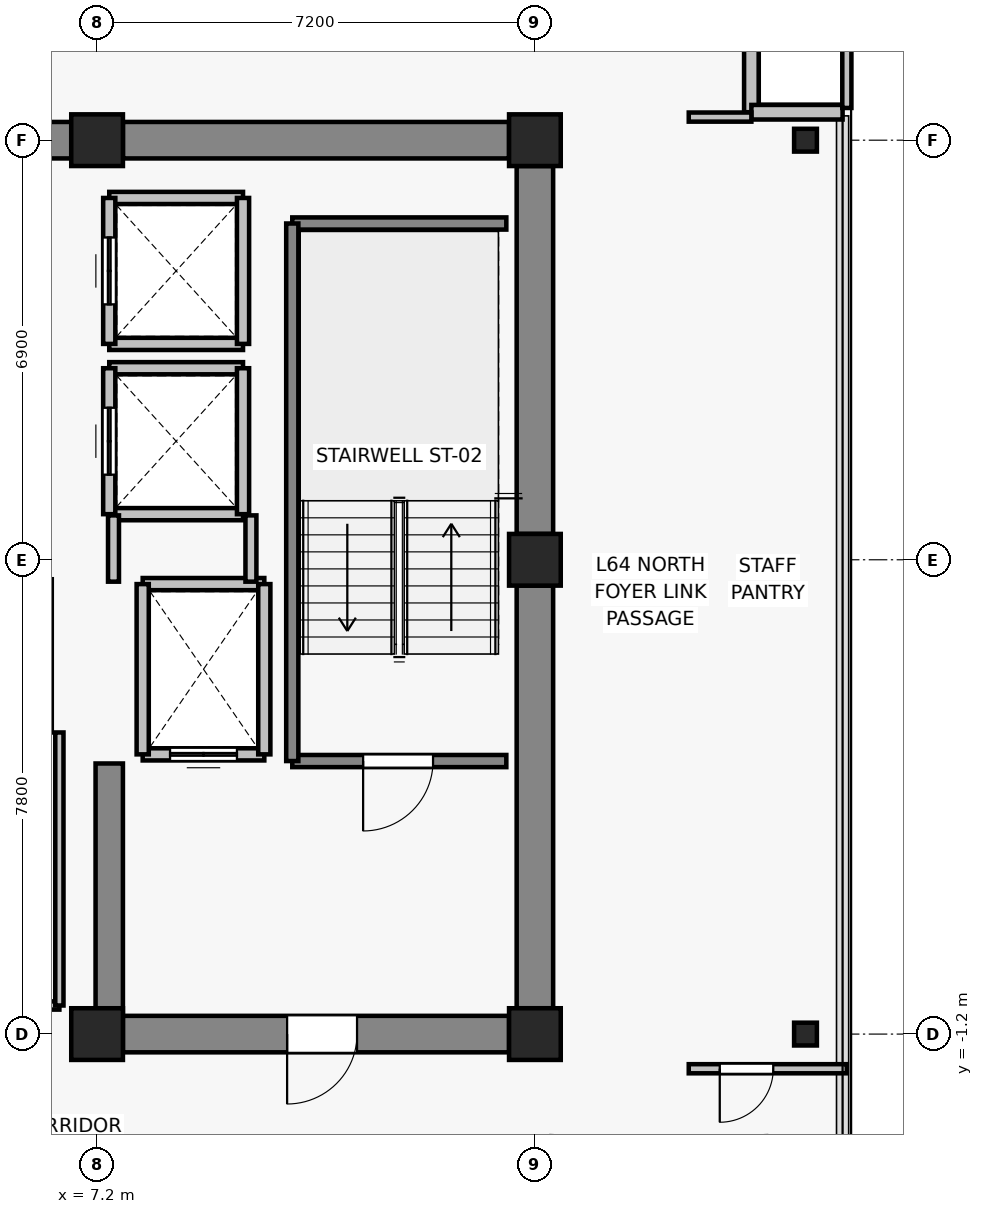
"""IFC4 building model, lengths in metres.
Left out: names, types, materials, properties, quantities, classifications, styles, units other than length and angle.
Written with IfcOpenShell. Run it as: python <this file> out.ifc"""

import sys

from ifc_helpers import new_model, si_unit, direction, frame, frame_2d, origin, origin_2d, place, context, subcontext, project, spatial, rectangle, i_section, extrude, source, transform, mapped, element, fill, save


model = new_model("IFC4")
c1 = context("Model", 3, precision=1e-05, world=origin(), true_north=direction((0.0, 1.0)))
c2 = subcontext(c1, "Body", "Model", "MODEL_VIEW")
j1 = project(units=[si_unit("LENGTHUNIT", "METRE"), si_unit("PLANEANGLEUNIT", "RADIAN")], contexts=[c1])
p1 = place(None, origin())
s1 = spatial("IfcSite", under=j1, at=p1, CompositionType="ELEMENT")
p2 = place(p1, origin())
s2 = spatial("IfcBuilding", under=s1, at=p2, CompositionType="ELEMENT")
p3 = place(p2, frame((0.0, 0.0, 228.7)))
s3 = spatial("IfcBuildingStorey", under=s2, at=p3, CompositionType="ELEMENT", Elevation=228.7)
for number, where, z_axis, x_axis in (
    (1, (7.2, -1.2, 0.0), (0.0, 0.0, 1.0), (1.0, 0.0, 0.0)),
    (2, (14.4, -1.2, 0.0), (0.0, 0.0, 1.0), (1.0, 0.0, 0.0)),
    (3, (14.4, 6.6, 0.0), (0.0, 0.0, 1.0), (1.0, 0.0, 0.0)),
    (4, (7.2, 13.5, 0.0), (0.0, 0.0, 1.0), (1.0, 0.0, 0.0)),
    (5, (14.4, 13.5, 0.0), (0.0, 0.0, 1.0), (1.0, 0.0, 0.0)),
):
    element("IfcColumn", number, at=place(p3, frame(where, z_axis=z_axis, x_axis=x_axis)), inside=s3, PredefinedType="COLUMN", context=c2, shape_type="SweptSolid", body=[
        extrude(rectangle(XDim=0.85, YDim=0.85, at=origin_2d()), origin(), (0.0, 0.0, 1.0), 3.3),
    ])
for number, where, z_axis, x_axis in (
    (6, (18.85, -1.2, 0.0), (0.0, 0.0, 1.0), (1.0, 0.0, 0.0)),
    (7, (18.85, 13.5, 0.0), (0.0, 0.0, 1.0), (1.0, 0.0, 0.0)),
):
    element("IfcColumn", number, at=place(p3, frame(where, z_axis=z_axis, x_axis=x_axis)), inside=s3, PredefinedType="COLUMN", context=c2, shape_type="SweptSolid", body=[
        extrude(i_section(OverallWidth=0.375, OverallDepth=0.375, WebThickness=0.017, FlangeThickness=0.027, FilletRadius=0.015, at=origin_2d()), origin(), (0.0, 0.0, 1.0), 3.3),
    ])
p4 = place(p3, frame((-6.775, 13.5, 0.0), z_axis=(0.0, 0.0, 1.0), x_axis=(1.0, 0.0, 0.0)))
e8 = element("IfcWall", 8, at=p4, inside=s3, PredefinedType="SHEAR", context=c2, shape_type="SweptSolid", body=[
    extrude(rectangle(XDim=13.55, YDim=0.6, at=frame_2d((6.775, 0.0))), origin(), (0.0, 0.0, 1.0), 3.075),
])
p5 = place(p3, frame((7.625, 13.5, 0.0), z_axis=(0.0, 0.0, 1.0), x_axis=(1.0, 0.0, 0.0)))
e9 = element("IfcWall", 9, at=p5, inside=s3, PredefinedType="SHEAR", context=c2, shape_type="SweptSolid", body=[
    extrude(rectangle(XDim=6.35, YDim=0.6, at=frame_2d((3.175, 0.0))), origin(), (0.0, 0.0, 1.0), 3.075),
])
p6 = place(p3, frame((14.4, -0.775, 0.0), z_axis=(0.0, 0.0, 1.0), x_axis=(0.0, 1.0, 0.0)))
e10 = element("IfcWall", 10, at=p6, inside=s3, PredefinedType="SHEAR", context=c2, shape_type="SweptSolid", body=[
    extrude(rectangle(XDim=6.95, YDim=0.6, at=frame_2d((3.475, 0.0))), origin(), (0.0, 0.0, 1.0), 3.075),
])
p7 = place(p3, frame((14.4, 7.025, 0.0), z_axis=(0.0, 0.0, 1.0), x_axis=(0.0, 1.0, 0.0)))
e11 = element("IfcWall", 11, at=p7, inside=s3, PredefinedType="SHEAR", context=c2, shape_type="SweptSolid", body=[
    extrude(rectangle(XDim=6.05, YDim=0.6, at=frame_2d((3.025, 0.0))), origin(), (0.0, 0.0, 1.0), 3.075),
])
p8 = place(p3, frame((13.975, -1.2, 0.0), z_axis=(0.0, 0.0, 1.0), x_axis=(-1.0, 0.0, 0.0)))
e12 = element("IfcWall", 12, at=p8, inside=s3, PredefinedType="SHEAR", context=c2, shape_type="SweptSolid", body=[
    extrude(rectangle(XDim=6.35, YDim=0.6, at=frame_2d((3.175, 0.0))), origin(), (0.0, 0.0, 1.0), 3.075),
])
p9 = place(p8, frame((2.5, 0.0, 0.0)))
e13 = element("IfcOpeningElement", 13, at=p9, cuts=e12, PredefinedType="OPENING", context=c2, shape_type="SweptSolid", body=[
    extrude(rectangle(XDim=1.15, YDim=2.15, at=frame_2d((0.575, 1.075))), frame((0.0, 0.31, 0.0), z_axis=(0.0, -1.0, 0.0), x_axis=(1.0, 0.0, 0.0)), (0.0, 0.0, 1.0), 0.62),
])
p10 = place(p3, frame((7.4, -0.9, 0.0), z_axis=(0.0, 0.0, 1.0), x_axis=(0.0, 1.0, 0.0)))
e14 = element("IfcWall", 14, at=p10, inside=s3, PredefinedType="SHEAR", context=c2, shape_type="SweptSolid", body=[
    extrude(rectangle(XDim=4.15, YDim=0.45, at=frame_2d((2.075, 0.0))), origin(), (0.0, 0.0, 1.0), 3.075),
])
for number, where, z_axis, x_axis in (
    (15, (17.96, 13.96, 0.0), (0.0, 0.0, 1.0), (0.0, 1.0, 0.0)),
    (16, (19.46, 13.96, 0.0), (0.0, 0.0, 1.0), (-1.0, 0.0, 0.0)),
):
    element("IfcWall", number, at=place(p3, frame(where, z_axis=z_axis, x_axis=x_axis)), inside=s3, PredefinedType="SOLIDWALL", context=c2, shape_type="SweptSolid", body=[
        extrude(rectangle(XDim=1.5, YDim=0.24, at=frame_2d((0.75, 0.0))), origin(), (0.0, 0.0, 1.0), 3.075),
    ])
p11 = place(p3, frame((9.95, 3.4, 0.0), z_axis=(0.0, 0.0, 1.0), x_axis=(-1.0, 0.0, 0.0)))
e17 = element("IfcWall", 17, at=p11, inside=s3, PredefinedType="SOLIDWALL", context=c2, shape_type="SweptSolid", body=[
    extrude(rectangle(XDim=2.0, YDim=0.2, at=frame_2d((1.0, 0.0))), origin(), (0.0, 0.0, 1.0), 3.075),
])
p12 = place(p11, frame((0.45, 0.0, 0.0)))
e18 = element("IfcOpeningElement", 18, at=p12, cuts=e17, PredefinedType="OPENING", context=c2, shape_type="SweptSolid", body=[
    extrude(rectangle(XDim=1.1, YDim=2.2, at=frame_2d((0.55, 1.1))), frame((0.0, 0.11, 0.0), z_axis=(0.0, -1.0, 0.0), x_axis=(1.0, 0.0, 0.0)), (0.0, 0.0, 1.0), 0.22),
])
p13 = place(p3, frame((7.95, 6.2, 0.0), z_axis=(0.0, 0.0, 1.0), x_axis=(1.0, 0.0, 0.0)))
e19 = element("IfcWall", 19, at=p13, inside=s3, PredefinedType="SOLIDWALL", context=c2, shape_type="SweptSolid", body=[
    extrude(rectangle(XDim=2.0, YDim=0.2, at=frame_2d((1.0, 0.0))), origin(), (0.0, 0.0, 1.0), 3.075),
])
for number, where, z_axis, x_axis in (
    (20, (7.95, 3.4, 0.0), (0.0, 0.0, 1.0), (0.0, 1.0, 0.0)),
    (21, (9.95, 6.2, 0.0), (0.0, 0.0, 1.0), (0.0, -1.0, 0.0)),
):
    element("IfcWall", number, at=place(p3, frame(where, z_axis=z_axis, x_axis=x_axis)), inside=s3, PredefinedType="SOLIDWALL", context=c2, shape_type="SweptSolid", body=[
        extrude(rectangle(XDim=2.8, YDim=0.2, at=frame_2d((1.4, 0.0))), origin(), (0.0, 0.0, 1.0), 3.075),
    ])
for number, where, z_axis, x_axis in (
    (22, (9.6, 7.35, 0.0), (0.0, 0.0, 1.0), (-1.0, 0.0, 0.0)),
    (23, (7.4, 9.75, 0.0), (0.0, 0.0, 1.0), (1.0, 0.0, 0.0)),
):
    element("IfcWall", number, at=place(p3, frame(where, z_axis=z_axis, x_axis=x_axis)), inside=s3, PredefinedType="SOLIDWALL", context=c2, shape_type="SweptSolid", body=[
        extrude(rectangle(XDim=2.2, YDim=0.2, at=frame_2d((1.1, 0.0))), origin(), (0.0, 0.0, 1.0), 2.615),
    ])
p14 = place(p3, frame((7.4, 7.35, 0.0), z_axis=(0.0, 0.0, 1.0), x_axis=(0.0, 1.0, 0.0)))
e24 = element("IfcWall", 24, at=p14, inside=s3, PredefinedType="SOLIDWALL", context=c2, shape_type="SweptSolid", body=[
    extrude(rectangle(XDim=2.4, YDim=0.2, at=frame_2d((1.2, 0.0))), origin(), (0.0, 0.0, 1.0), 2.615),
])
p15 = place(p14, frame((0.65, 0.0, 0.0)))
e25 = element("IfcOpeningElement", 25, at=p15, cuts=e24, PredefinedType="OPENING", context=c2, shape_type="SweptSolid", body=[
    extrude(rectangle(XDim=1.1, YDim=2.2, at=frame_2d((0.55, 1.1))), frame((0.0, 0.11, 0.0), z_axis=(0.0, -1.0, 0.0), x_axis=(1.0, 0.0, 0.0)), (0.0, 0.0, 1.0), 0.22),
])
p16 = place(p3, frame((9.6, 9.75, 0.0), z_axis=(0.0, 0.0, 1.0), x_axis=(0.0, -1.0, 0.0)))
e26 = element("IfcWall", 26, at=p16, inside=s3, PredefinedType="SOLIDWALL", context=c2, shape_type="SweptSolid", body=[
    extrude(rectangle(XDim=2.4, YDim=0.2, at=frame_2d((1.2, 0.0))), origin(), (0.0, 0.0, 1.0), 3.075),
])
for number, where, z_axis, x_axis in (
    (27, (9.6, 10.15, 0.0), (0.0, 0.0, 1.0), (-1.0, 0.0, 0.0)),
    (28, (7.4, 12.55, 0.0), (0.0, 0.0, 1.0), (1.0, 0.0, 0.0)),
):
    element("IfcWall", number, at=place(p3, frame(where, z_axis=z_axis, x_axis=x_axis)), inside=s3, PredefinedType="SOLIDWALL", context=c2, shape_type="SweptSolid", body=[
        extrude(rectangle(XDim=2.2, YDim=0.2, at=frame_2d((1.1, 0.0))), origin(), (0.0, 0.0, 1.0), 2.615),
    ])
p17 = place(p3, frame((7.4, 10.15, 0.0), z_axis=(0.0, 0.0, 1.0), x_axis=(0.0, 1.0, 0.0)))
e29 = element("IfcWall", 29, at=p17, inside=s3, PredefinedType="SOLIDWALL", context=c2, shape_type="SweptSolid", body=[
    extrude(rectangle(XDim=2.4, YDim=0.2, at=frame_2d((1.2, 0.0))), origin(), (0.0, 0.0, 1.0), 2.615),
])
p18 = place(p17, frame((0.65, 0.0, 0.0)))
e30 = element("IfcOpeningElement", 30, at=p18, cuts=e29, PredefinedType="OPENING", context=c2, shape_type="SweptSolid", body=[
    extrude(rectangle(XDim=1.1, YDim=2.2, at=frame_2d((0.55, 1.1))), frame((0.0, 0.11, 0.0), z_axis=(0.0, -1.0, 0.0), x_axis=(1.0, 0.0, 0.0)), (0.0, 0.0, 1.0), 0.22),
])
p19 = place(p3, frame((9.6, 12.55, 0.0), z_axis=(0.0, 0.0, 1.0), x_axis=(0.0, -1.0, 0.0)))
e31 = element("IfcWall", 31, at=p19, inside=s3, PredefinedType="SOLIDWALL", context=c2, shape_type="SweptSolid", body=[
    extrude(rectangle(XDim=2.4, YDim=0.2, at=frame_2d((1.2, 0.0))), origin(), (0.0, 0.0, 1.0), 3.075),
])
p20 = place(p3, frame((13.93, 3.29, 0.0), z_axis=(0.0, 0.0, 1.0), x_axis=(-1.0, 0.0, 0.0)))
e32 = element("IfcWall", 32, at=p20, inside=s3, PredefinedType="SOLIDWALL", context=c2, shape_type="SweptSolid", body=[
    extrude(rectangle(XDim=3.52, YDim=0.2, at=frame_2d((1.76, 0.0))), origin(), (0.0, 0.0, 1.0), 3.075),
])
p21 = place(p20, frame((1.205, 0.0, 0.0)))
e33 = element("IfcOpeningElement", 33, at=p21, cuts=e32, PredefinedType="OPENING", context=c2, shape_type="SweptSolid", body=[
    extrude(rectangle(XDim=1.15, YDim=2.15, at=frame_2d((0.575, 1.075))), frame((0.0, 0.11, 0.0), z_axis=(0.0, -1.0, 0.0), x_axis=(1.0, 0.0, 0.0)), (0.0, 0.0, 1.0), 0.22),
])
p22 = place(p3, frame((10.41, 12.13, 0.0), z_axis=(0.0, 0.0, 1.0), x_axis=(1.0, 0.0, 0.0)))
e34 = element("IfcWall", 34, at=p22, inside=s3, PredefinedType="SOLIDWALL", context=c2, shape_type="SweptSolid", body=[
    extrude(rectangle(XDim=3.52, YDim=0.2, at=frame_2d((1.76, 0.0))), origin(), (0.0, 0.0, 1.0), 3.075),
])
p23 = place(p3, frame((10.41, 3.29, 0.0), z_axis=(0.0, 0.0, 1.0), x_axis=(0.0, 1.0, 0.0)))
e35 = element("IfcWall", 35, at=p23, inside=s3, PredefinedType="SOLIDWALL", context=c2, shape_type="SweptSolid", body=[
    extrude(rectangle(XDim=8.84, YDim=0.2, at=frame_2d((4.42, 0.0))), origin(), (0.0, 0.0, 1.0), 3.075),
])
p24 = place(p3, frame((7.47, 6.24, 0.0), z_axis=(0.0, 0.0, 1.0), x_axis=(0.0, 1.0, 0.0)))
e36 = element("IfcWall", 36, at=p24, inside=s3, PredefinedType="PARTITIONING", context=c2, shape_type="SweptSolid", body=[
    extrude(rectangle(XDim=1.09, YDim=0.18, at=frame_2d((0.545, 0.0))), origin(), (0.0, 0.0, 1.0), 2.615),
])
p25 = place(p3, frame((9.73, 7.33, 0.0), z_axis=(0.0, 0.0, 1.0), x_axis=(0.0, -1.0, 0.0)))
e37 = element("IfcWall", 37, at=p25, inside=s3, PredefinedType="PARTITIONING", context=c2, shape_type="SweptSolid", body=[
    extrude(rectangle(XDim=1.09, YDim=0.18, at=frame_2d((0.545, 0.0))), origin(), (0.0, 0.0, 1.0), 3.075),
])
p26 = place(p3, frame((6.58, -0.73, 0.0), z_axis=(0.0, 0.0, 1.0), x_axis=(-1.0, 0.0, 0.0)))
e38 = element("IfcWall", 38, at=p26, inside=s3, PredefinedType="PARTITIONING", context=c2, shape_type="SweptSolid", body=[
    extrude(rectangle(XDim=2.9, YDim=0.135, at=frame_2d((1.45, 0.0))), origin(), (0.0, 0.0, 1.0), 3.075),
])
p27 = place(p26, frame((0.99, 0.0, 0.0)))
e39 = element("IfcOpeningElement", 39, at=p27, cuts=e38, PredefinedType="OPENING", context=c2, shape_type="SweptSolid", body=[
    extrude(rectangle(XDim=0.92, YDim=2.1, at=frame_2d((0.46, 1.05))), frame((0.0, 0.077, 0.0), z_axis=(0.0, -1.0, 0.0), x_axis=(1.0, 0.0, 0.0)), (0.0, 0.0, 1.0), 0.155),
])
p28 = place(p3, frame((6.58, 3.76, 0.0), z_axis=(0.0, 0.0, 1.0), x_axis=(0.0, -1.0, 0.0)))
e40 = element("IfcWall", 40, at=p28, inside=s3, PredefinedType="PARTITIONING", context=c2, shape_type="SweptSolid", body=[
    extrude(rectangle(XDim=4.49, YDim=0.135, at=frame_2d((2.245, 0.0))), origin(), (0.0, 0.0, 1.0), 3.075),
])
p29 = place(p3, frame((19.53, -1.77, 0.0), z_axis=(0.0, 0.0, 1.0), x_axis=(-1.0, 0.0, 0.0)))
e41 = element("IfcWall", 41, at=p29, inside=s3, PredefinedType="PARTITIONING", context=c2, shape_type="SweptSolid", body=[
    extrude(rectangle(XDim=2.6, YDim=0.15, at=frame_2d((1.3, 0.0))), origin(), (0.0, 0.0, 1.0), 3.075),
])
p30 = place(p29, frame((1.21, 0.0, 0.0)))
e42 = element("IfcOpeningElement", 42, at=p30, cuts=e41, PredefinedType="OPENING", context=c2, shape_type="SweptSolid", body=[
    extrude(rectangle(XDim=0.88, YDim=2.1, at=frame_2d((0.44, 1.05))), frame((0.0, 0.085, 0.0), z_axis=(0.0, -1.0, 0.0), x_axis=(1.0, 0.0, 0.0)), (0.0, 0.0, 1.0), 0.17),
])
p31 = place(p3, frame((16.93, 13.88, 0.0), z_axis=(0.0, 0.0, 1.0), x_axis=(1.0, 0.0, 0.0)))
e43 = element("IfcWall", 43, at=p31, inside=s3, PredefinedType="PARTITIONING", context=c2, shape_type="SweptSolid", body=[
    extrude(rectangle(XDim=1.03, YDim=0.15, at=frame_2d((0.515, 0.0))), origin(), (0.0, 0.0, 1.0), 3.075),
])
p32 = place(p3, frame((19.53, 17.03, 0.0), z_axis=(0.0, 0.0, 1.0), x_axis=(0.0, -1.0, 0.0)))
e44 = element("IfcWall", 44, at=p32, inside=s3, PredefinedType="PARTITIONING", context=c2, shape_type="SweptSolid", body=[
    extrude(rectangle(XDim=3.0, YDim=0.15, at=frame_2d((1.5, 0.0))), origin(), (0.0, 0.0, 1.0), 3.075),
])
m1 = source(origin(), c2, "Body", "SweptSolid", [
    extrude(rectangle(XDim=1.1, YDim=2.2, at=frame_2d((0.55, 1.1))), frame((0.0, 0.025, 0.0), z_axis=(0.0, -1.0, 0.0), x_axis=(1.0, 0.0, 0.0)), (0.0, 0.0, 1.0), 0.05),
])
p33 = place(p12, origin())
e45 = element("IfcDoor", 45, at=p33, inside=s3, OperationType="DOUBLE_DOOR_SLIDING", PredefinedType="DOOR", context=c2, shape_type="MappedRepresentation", body=[
    mapped(m1, transform((0.0, 0.0, 0.0), x_axis=(1.0, 0.0, 0.0), y_axis=(0.0, 1.0, 0.0), z_axis=(0.0, 0.0, 1.0), scale=1.0)),
])
fill(e18, e45)
p34 = place(p15, origin())
e46 = element("IfcDoor", 46, at=p34, inside=s3, OperationType="DOUBLE_DOOR_SLIDING", PredefinedType="DOOR", context=c2, shape_type="MappedRepresentation", body=[
    mapped(m1, transform((0.0, 0.0, 0.0), x_axis=(1.0, 0.0, 0.0), y_axis=(0.0, 1.0, 0.0), z_axis=(0.0, 0.0, 1.0), scale=1.0)),
])
fill(e25, e46)
p35 = place(p18, origin())
e47 = element("IfcDoor", 47, at=p35, inside=s3, OperationType="DOUBLE_DOOR_SLIDING", PredefinedType="DOOR", context=c2, shape_type="MappedRepresentation", body=[
    mapped(m1, transform((0.0, 0.0, 0.0), x_axis=(1.0, 0.0, 0.0), y_axis=(0.0, 1.0, 0.0), z_axis=(0.0, 0.0, 1.0), scale=1.0)),
])
fill(e30, e47)
m2 = source(origin(), c2, "Body", "SweptSolid", [
    extrude(rectangle(XDim=1.15, YDim=2.15, at=frame_2d((0.575, 1.075))), frame((0.0, 0.025, 0.0), z_axis=(0.0, -1.0, 0.0), x_axis=(1.0, 0.0, 0.0)), (0.0, 0.0, 1.0), 0.05),
])
p36 = place(p21, origin())
e48 = element("IfcDoor", 48, at=p36, inside=s3, OperationType="SINGLE_SWING_RIGHT", PredefinedType="DOOR", context=c2, shape_type="MappedRepresentation", body=[
    mapped(m2, transform((0.0, 0.0, 0.0), x_axis=(1.0, 0.0, 0.0), y_axis=(0.0, 1.0, 0.0), z_axis=(0.0, 0.0, 1.0), scale=1.0)),
])
fill(e33, e48)
p37 = place(p9, origin())
e49 = element("IfcDoor", 49, at=p37, inside=s3, OperationType="SINGLE_SWING_RIGHT", PredefinedType="DOOR", context=c2, shape_type="MappedRepresentation", body=[
    mapped(m2, transform((0.0, 0.0, 0.0), x_axis=(1.0, 0.0, 0.0), y_axis=(0.0, 1.0, 0.0), z_axis=(0.0, 0.0, 1.0), scale=1.0)),
])
fill(e13, e49)
m3 = source(origin(), c2, "Body", "SweptSolid", [
    extrude(rectangle(XDim=0.88, YDim=2.1, at=frame_2d((0.44, 1.05))), frame((0.0, 0.025, 0.0), z_axis=(0.0, -1.0, 0.0), x_axis=(1.0, 0.0, 0.0)), (0.0, 0.0, 1.0), 0.05),
])
p38 = place(p30, origin())
e50 = element("IfcDoor", 50, at=p38, inside=s3, OperationType="SINGLE_SWING_RIGHT", PredefinedType="DOOR", context=c2, shape_type="MappedRepresentation", body=[
    mapped(m3, transform((0.0, 0.0, 0.0), x_axis=(1.0, 0.0, 0.0), y_axis=(0.0, 1.0, 0.0), z_axis=(0.0, 0.0, 1.0), scale=1.0)),
])
fill(e42, e50)
save(model, sys.argv[1])
